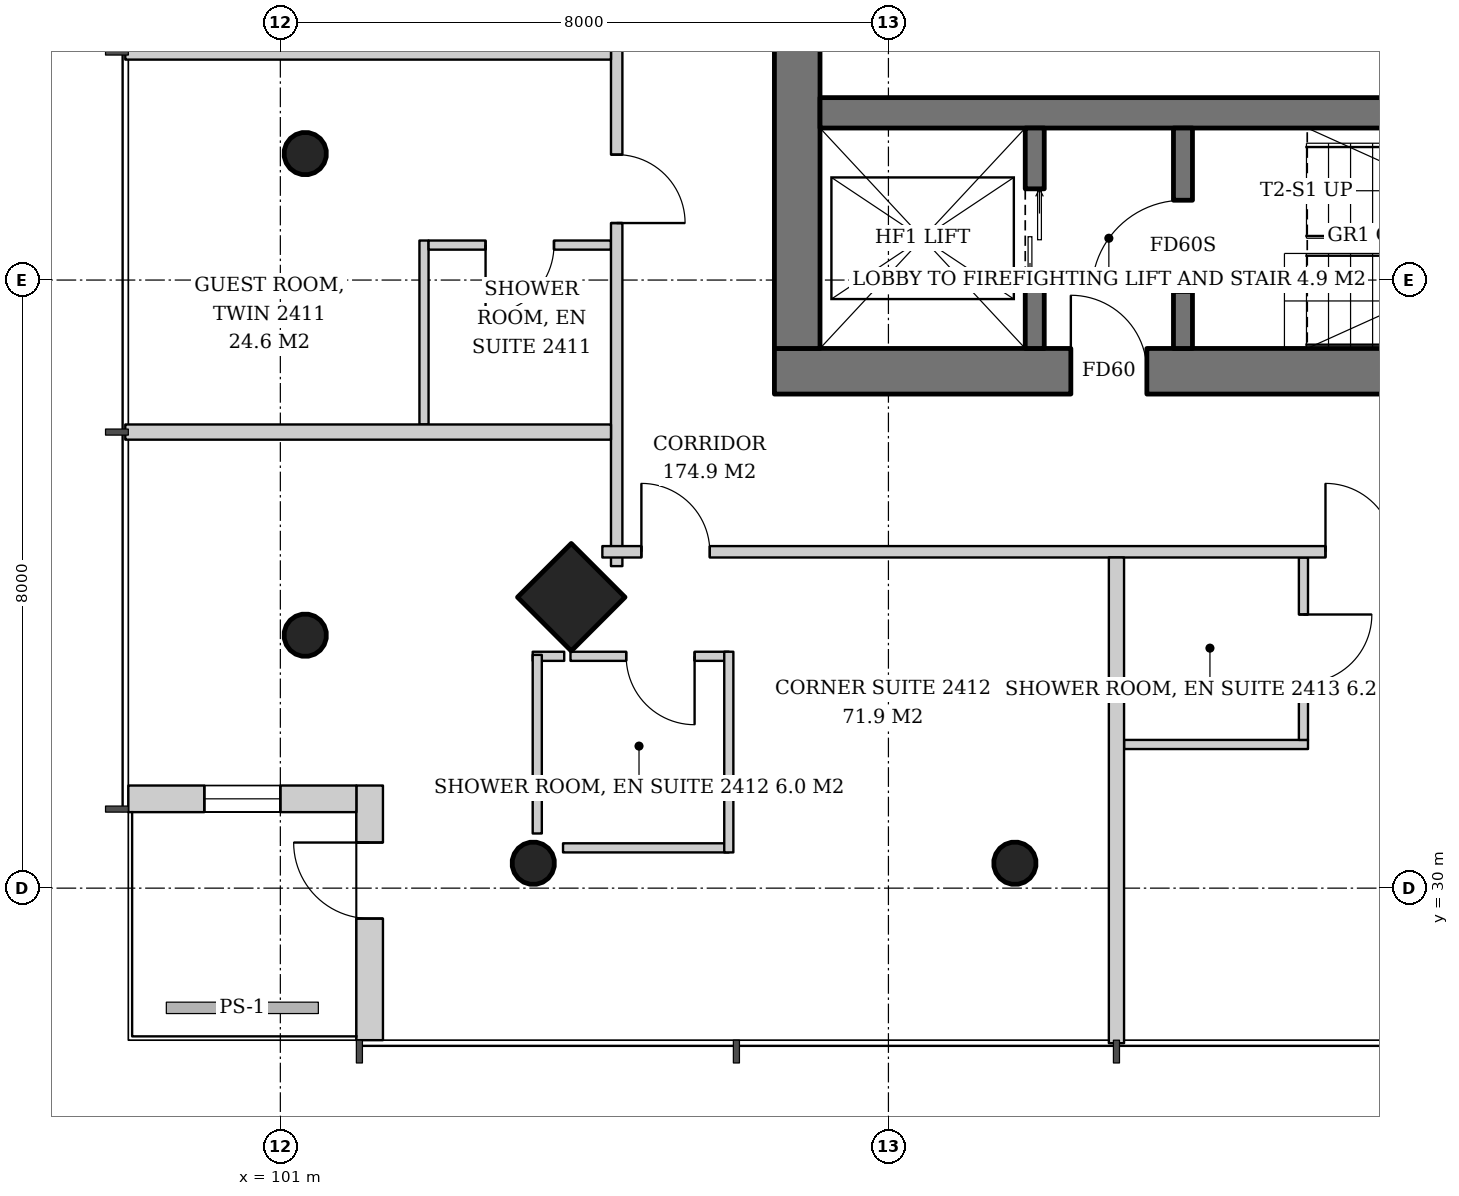
"""IFC4 building model, lengths in metres.
Left out: names, types, materials, properties, quantities, classifications, styles, units other than length and angle.
Written with IfcOpenShell. Run it as: python <this file> out.ifc"""

import sys

from ifc_helpers import new_model, si_unit, direction, frame, frame_2d, origin, origin_2d, place, context, subcontext, project, spatial, rectangle, hollow_circle, extrude, element, fill, save


model = new_model("IFC4")
c1 = context("Model", 3, precision=1e-05, world=origin(), true_north=direction((0.0, 1.0)))
c2 = subcontext(c1, "Body", "Model", "MODEL_VIEW")
j1 = project(units=[si_unit("LENGTHUNIT", "METRE"), si_unit("PLANEANGLEUNIT", "RADIAN")], contexts=[c1])
p1 = place(None, origin())
s1 = spatial("IfcSite", under=j1, at=p1, CompositionType="ELEMENT")
p2 = place(p1, origin())
s2 = spatial("IfcBuilding", under=s1, at=p2, CompositionType="ELEMENT")
p3 = place(p2, frame((0.0, 0.0, 97.0)))
s3 = spatial("IfcBuildingStorey", under=s2, at=p3, CompositionType="ELEMENT", Elevation=97.0)
p4 = place(p3, frame((104.776, 33.776, 0.0), z_axis=(0.043029647111, 0.043029647111, 0.998146732169), x_axis=(-0.707106781187, 0.707106781187, 0.0)))
e1 = element("IfcColumn", 1, at=p4, inside=s3, PredefinedType="COLUMN", context=c2, shape_type="SweptSolid", body=[
    extrude(rectangle(XDim=1.0, YDim=1.0, at=origin_2d()), origin(), (0.0, 0.0, 1.0), 3.807),
])
p5 = place(p3, frame((101.276, 33.276, 0.0), z_axis=(0.043029647111, 0.043029647111, 0.998146732169), x_axis=(-0.707106781187, 0.707106781187, 0.0)))
e2 = element("IfcColumn", 2, at=p5, inside=s3, PredefinedType="COLUMN", context=c2, shape_type="SweptSolid", body=[
    extrude(hollow_circle(Radius=0.28, WallThickness=0.02, at=origin_2d()), origin(), (0.0, 0.0, 1.0), 3.807),
])
p6 = place(p3, frame((101.276, 39.638, 0.0), z_axis=(0.043059584825, 0.021497706284, 0.998841188968), x_axis=(-0.446680166538, 0.894693706707, 0.0)))
e3 = element("IfcColumn", 3, at=p6, inside=s3, PredefinedType="COLUMN", context=c2, shape_type="SweptSolid", body=[
    extrude(hollow_circle(Radius=0.28, WallThickness=0.02, at=origin_2d()), origin(), (0.0, 0.0, 1.0), 3.804),
])
p7 = place(p3, frame((104.276, 30.276, 0.0), z_axis=(0.043029647111, 0.043029647111, 0.998146732169), x_axis=(-0.707106781187, 0.707106781187, 0.0)))
e4 = element("IfcColumn", 4, at=p7, inside=s3, PredefinedType="COLUMN", context=c2, shape_type="SweptSolid", body=[
    extrude(hollow_circle(Radius=0.28, WallThickness=0.02, at=origin_2d()), origin(), (0.0, 0.0, 1.0), 3.807),
])
p8 = place(p3, frame((110.638, 30.276, 0.0), z_axis=(0.021497706284, 0.043059584825, 0.998841188968), x_axis=(-0.894693706707, 0.446680166538, 0.0)))
e5 = element("IfcColumn", 5, at=p8, inside=s3, PredefinedType="COLUMN", context=c2, shape_type="SweptSolid", body=[
    extrude(hollow_circle(Radius=0.28, WallThickness=0.02, at=origin_2d()), origin(), (0.0, 0.0, 1.0), 3.804),
])
p9 = place(p3, frame((107.5, 36.8, 0.0), z_axis=(0.0, 0.0, 1.0), x_axis=(1.0, 0.0, 0.0)))
e6 = element("IfcWall", 6, at=p9, inside=s3, PredefinedType="SHEAR", context=c2, shape_type="SweptSolid", body=[
    extrude(rectangle(XDim=19.0, YDim=0.6, at=frame_2d((9.5, 0.0))), origin(), (0.0, 0.0, 1.0), 3.8),
])
p10 = place(p9, frame((3.9, 0.0, 0.0)))
e7 = element("IfcOpeningElement", 7, at=p10, cuts=e6, PredefinedType="OPENING", context=c2, shape_type="SweptSolid", body=[
    extrude(rectangle(XDim=1.0, YDim=2.1, at=frame_2d((0.5, 1.05))), frame((0.0, 0.31, 0.0), z_axis=(0.0, -1.0, 0.0), x_axis=(1.0, 0.0, 0.0)), (0.0, 0.0, 1.0), 0.62),
])
p11 = place(p9, frame((14.153, 0.0, 0.0)))
e8 = element("IfcOpeningElement", 8, at=p11, cuts=e6, PredefinedType="OPENING", context=c2, shape_type="SweptSolid", body=[
    extrude(rectangle(XDim=1.0, YDim=2.1, at=frame_2d((0.5, 1.05))), frame((0.0, 0.31, 0.0), z_axis=(0.0, -1.0, 0.0), x_axis=(1.0, 0.0, 0.0)), (0.0, 0.0, 1.0), 0.62),
])
p12 = place(p9, frame((16.2, 0.0, 0.0)))
e9 = element("IfcOpeningElement", 9, at=p12, cuts=e6, PredefinedType="OPENING", context=c2, shape_type="SweptSolid", body=[
    extrude(rectangle(XDim=1.0, YDim=2.1, at=frame_2d((0.5, 1.05))), frame((0.0, 0.31, 0.0), z_axis=(0.0, -1.0, 0.0), x_axis=(1.0, 0.0, 0.0)), (0.0, 0.0, 1.0), 0.62),
])
p13 = place(p3, frame((107.8, 37.1, 0.0), z_axis=(0.0, 0.0, 1.0), x_axis=(0.0, 1.0, 0.0)))
e10 = element("IfcWall", 10, at=p13, inside=s3, PredefinedType="SHEAR", context=c2, shape_type="SweptSolid", body=[
    extrude(rectangle(XDim=17.8, YDim=0.6, at=frame_2d((8.9, 0.0))), origin(), (0.0, 0.0, 1.0), 3.8),
])
p14 = place(p13, frame((8.0, 0.0, 0.0)))
e11 = element("IfcOpeningElement", 11, at=p14, cuts=e10, PredefinedType="OPENING", context=c2, shape_type="SweptSolid", body=[
    extrude(rectangle(XDim=1.8, YDim=2.4, at=frame_2d((0.9, 1.2))), frame((0.0, 0.31, 0.0), z_axis=(0.0, -1.0, 0.0), x_axis=(1.0, 0.0, 0.0)), (0.0, 0.0, 1.0), 0.62),
])
p15 = place(p3, frame((108.1, 40.2, 0.0), z_axis=(0.0, 0.0, 1.0), x_axis=(1.0, 0.0, 0.0)))
e12 = element("IfcWall", 12, at=p15, inside=s3, PredefinedType="SHEAR", context=c2, shape_type="SweptSolid", body=[
    extrude(rectangle(XDim=17.8, YDim=0.4, at=frame_2d((8.9, 0.0))), origin(), (0.0, 0.0, 1.0), 3.8),
])
p16 = place(p3, frame((102.175, 28.0, 0.0), z_axis=(0.0, 0.0, 1.0), x_axis=(0.0, 1.0, 0.0)))
e13 = element("IfcWall", 13, at=p16, inside=s3, PredefinedType="SOLIDWALL", context=c2, shape_type="SweptSolid", body=[
    extrude(rectangle(XDim=3.35, YDim=0.35, at=frame_2d((1.675, 0.0))), origin(), (0.0, 0.0, 1.0), 3.6),
])
p17 = place(p16, frame((1.6, 0.0, 0.0)))
e14 = element("IfcOpeningElement", 14, at=p17, cuts=e13, PredefinedType="OPENING", context=c2, shape_type="SweptSolid", body=[
    extrude(rectangle(XDim=1.0, YDim=2.4, at=frame_2d((0.5, 1.2))), frame((0.0, 0.185, 0.0), z_axis=(0.0, -1.0, 0.0), x_axis=(1.0, 0.0, 0.0)), (0.0, 0.0, 1.0), 0.37),
])
p18 = place(p3, frame((102.0, 31.175, 0.0), z_axis=(0.0, 0.0, 1.0), x_axis=(-1.0, 0.0, 0.0)))
e15 = element("IfcWall", 15, at=p18, inside=s3, PredefinedType="SOLIDWALL", context=c2, shape_type="SweptSolid", body=[
    extrude(rectangle(XDim=3.0, YDim=0.35, at=frame_2d((1.5, 0.0))), origin(), (0.0, 0.0, 1.0), 3.6),
])
p19 = place(p18, frame((1.0, 0.0, 0.9)))
e16 = element("IfcOpeningElement", 16, at=p19, cuts=e15, PredefinedType="OPENING", context=c2, shape_type="SweptSolid", body=[
    extrude(rectangle(XDim=1.0, YDim=2.4, at=frame_2d((0.5, 1.2))), frame((0.0, 0.185, 0.0), z_axis=(0.0, -1.0, 0.0), x_axis=(1.0, 0.0, 0.0)), (0.0, 0.0, 1.0), 0.37),
])
p20 = place(p3, frame((110.925, 37.1, 0.0), z_axis=(0.0, 0.0, 1.0), x_axis=(0.0, 1.0, 0.0)))
e17 = element("IfcWall", 17, at=p20, inside=s3, PredefinedType="SHEAR", context=c2, shape_type="SweptSolid", body=[
    extrude(rectangle(XDim=2.9, YDim=0.25, at=frame_2d((1.45, 0.0))), origin(), (0.0, 0.0, 1.0), 3.8),
])
p21 = place(p20, frame((0.8, 0.0, 0.0)))
e18 = element("IfcOpeningElement", 18, at=p21, cuts=e17, PredefinedType="OPENING", context=c2, shape_type="SweptSolid", body=[
    extrude(rectangle(XDim=1.3, YDim=2.2, at=frame_2d((0.65, 1.1))), frame((0.0, 0.135, 0.0), z_axis=(0.0, -1.0, 0.0), x_axis=(1.0, 0.0, 0.0)), (0.0, 0.0, 1.0), 0.27),
])
p22 = place(p3, frame((112.875, 37.1, 0.0), z_axis=(0.0, 0.0, 1.0), x_axis=(0.0, 1.0, 0.0)))
e19 = element("IfcWall", 19, at=p22, inside=s3, PredefinedType="SHEAR", context=c2, shape_type="SweptSolid", body=[
    extrude(rectangle(XDim=2.9, YDim=0.25, at=frame_2d((1.45, 0.0))), origin(), (0.0, 0.0, 1.0), 3.8),
])
p23 = place(p22, frame((0.75, 0.0, 0.0)))
e20 = element("IfcOpeningElement", 20, at=p23, cuts=e19, PredefinedType="OPENING", context=c2, shape_type="SweptSolid", body=[
    extrude(rectangle(XDim=1.2, YDim=2.1, at=frame_2d((0.6, 1.05))), frame((0.0, 0.135, 0.0), z_axis=(0.0, -1.0, 0.0), x_axis=(1.0, 0.0, 0.0)), (0.0, 0.0, 1.0), 0.27),
])
p24 = place(p3, frame((102.89, 38.52, 0.0), z_axis=(0.0, 0.0, 1.0), x_axis=(0.0, -1.0, 0.0)))
e21 = element("IfcWall", 21, at=p24, inside=s3, PredefinedType="PARTITIONING", context=c2, shape_type="SweptSolid", body=[
    extrude(rectangle(XDim=2.42, YDim=0.12, at=frame_2d((1.21, 0.0))), origin(), (0.0, 0.0, 1.0), 3.6),
])
p25 = place(p3, frame((105.35, 38.46, 0.0), z_axis=(0.0, 0.0, 1.0), x_axis=(-1.0, 0.0, 0.0)))
e22 = element("IfcWall", 22, at=p25, inside=s3, PredefinedType="PARTITIONING", context=c2, shape_type="SweptSolid", body=[
    extrude(rectangle(XDim=2.4, YDim=0.12, at=frame_2d((1.2, 0.0))), origin(), (0.0, 0.0, 1.0), 3.6),
])
p26 = place(p25, frame((0.75, 0.0, 0.0)))
e23 = element("IfcOpeningElement", 23, at=p26, cuts=e22, PredefinedType="OPENING", context=c2, shape_type="SweptSolid", body=[
    extrude(rectangle(XDim=0.9, YDim=2.1, at=frame_2d((0.45, 1.05))), frame((0.0, 0.07, 0.0), z_axis=(0.0, -1.0, 0.0), x_axis=(1.0, 0.0, 0.0)), (0.0, 0.0, 1.0), 0.14),
])
p27 = place(p3, frame((105.425, 57.764, 0.0), z_axis=(0.0, 0.0, 1.0), x_axis=(0.0, -1.0, 0.0)))
e24 = element("IfcWall", 24, at=p27, inside=s3, PredefinedType="PARTITIONING", context=c2, shape_type="SweptSolid", body=[
    extrude(rectangle(XDim=23.527, YDim=0.15, at=frame_2d((11.764, 0.0))), origin(), (0.0, 0.0, 1.0), 2.9),
])
p28 = place(p27, frame((0.514, 0.0, 0.0)))
e25 = element("IfcOpeningElement", 25, at=p28, cuts=e24, PredefinedType="OPENING", context=c2, shape_type="SweptSolid", body=[
    extrude(rectangle(XDim=0.9, YDim=2.1, at=frame_2d((0.45, 1.05))), frame((0.0, 0.085, 0.0), z_axis=(0.0, -1.0, 0.0), x_axis=(1.0, 0.0, 0.0)), (0.0, 0.0, 1.0), 0.17),
])
p29 = place(p27, frame((4.464, 0.0, 0.0)))
e26 = element("IfcOpeningElement", 26, at=p29, cuts=e24, PredefinedType="OPENING", context=c2, shape_type="SweptSolid", body=[
    extrude(rectangle(XDim=1.0, YDim=2.1, at=frame_2d((0.5, 1.05))), frame((0.0, 0.085, 0.0), z_axis=(0.0, -1.0, 0.0), x_axis=(1.0, 0.0, 0.0)), (0.0, 0.0, 1.0), 0.17),
])
p30 = place(p27, frame((9.514, 0.0, 0.0)))
e27 = element("IfcOpeningElement", 27, at=p30, cuts=e24, PredefinedType="OPENING", context=c2, shape_type="SweptSolid", body=[
    extrude(rectangle(XDim=0.9, YDim=2.1, at=frame_2d((0.45, 1.05))), frame((0.0, 0.085, 0.0), z_axis=(0.0, -1.0, 0.0), x_axis=(1.0, 0.0, 0.0)), (0.0, 0.0, 1.0), 0.17),
])
p31 = place(p27, frame((18.114, 0.0, 0.0)))
e28 = element("IfcOpeningElement", 28, at=p31, cuts=e24, PredefinedType="OPENING", context=c2, shape_type="SweptSolid", body=[
    extrude(rectangle(XDim=0.9, YDim=2.1, at=frame_2d((0.45, 1.05))), frame((0.0, 0.085, 0.0), z_axis=(0.0, -1.0, 0.0), x_axis=(1.0, 0.0, 0.0)), (0.0, 0.0, 1.0), 0.17),
])
for number, where, z_axis, x_axis in (
    (29, (105.35, 41.0, 0.0), (0.0, 0.0, 1.0), (-1.0, 0.0, 0.0)),
    (30, (105.35, 36.0, 0.0), (0.0, 0.0, 1.0), (-1.0, 0.0, 0.0)),
):
    element("IfcWall", number, at=place(p3, frame(where, z_axis=z_axis, x_axis=x_axis)), inside=s3, PredefinedType="PARTITIONING", context=c2, shape_type="SweptSolid", body=[
        extrude(rectangle(XDim=6.39, YDim=0.2, at=frame_2d((3.195, 0.0))), origin(), (0.0, 0.0, 1.0), 3.2),
    ])
p32 = place(p3, frame((106.9, 33.05, 0.0), z_axis=(0.0, 0.0, 1.0), x_axis=(-1.0, 0.0, 0.0)))
e31 = element("IfcWall", 31, at=p32, inside=s3, PredefinedType="PARTITIONING", context=c2, shape_type="SweptSolid", body=[
    extrude(rectangle(XDim=2.083, YDim=0.12, at=frame_2d((1.042, 0.0))), origin(), (0.0, 0.0, 1.0), 3.2),
])
p33 = place(p32, frame((0.45, 0.0, 0.0)))
e32 = element("IfcOpeningElement", 32, at=p33, cuts=e31, PredefinedType="OPENING", context=c2, shape_type="SweptSolid", body=[
    extrude(rectangle(XDim=0.9, YDim=2.1, at=frame_2d((0.45, 1.05))), frame((0.0, 0.07, 0.0), z_axis=(0.0, -1.0, 0.0), x_axis=(1.0, 0.0, 0.0)), (0.0, 0.0, 1.0), 0.14),
])
p34 = place(p3, frame((104.735, 33.05, 0.0), z_axis=(0.0, 0.0, 1.0), x_axis=(-1.0, 0.0, 0.0)))
e33 = element("IfcWall", 33, at=p34, inside=s3, PredefinedType="PARTITIONING", context=c2, shape_type="SweptSolid", body=[
    extrude(rectangle(XDim=0.415, YDim=0.12, at=frame_2d((0.207, 0.0))), origin(), (0.0, 0.0, 1.0), 3.2),
])
p35 = place(p3, frame((106.9, 30.53, 0.0), z_axis=(0.0, 0.0, 1.0), x_axis=(-1.0, 0.0, 0.0)))
e34 = element("IfcWall", 34, at=p35, inside=s3, PredefinedType="PARTITIONING", context=c2, shape_type="SweptSolid", body=[
    extrude(rectangle(XDim=2.181, YDim=0.12, at=frame_2d((1.09, 0.0))), origin(), (0.0, 0.0, 1.0), 3.2),
])
p36 = place(p3, frame((104.38, 33.069, 0.0), z_axis=(0.0, 0.0, 1.0), x_axis=(0.0, -1.0, 0.0)))
e35 = element("IfcWall", 35, at=p36, inside=s3, PredefinedType="PARTITIONING", context=c2, shape_type="SweptSolid", body=[
    extrude(rectangle(XDim=2.35, YDim=0.12, at=frame_2d((1.175, 0.0))), origin(), (0.0, 0.0, 1.0), 3.2),
])
p37 = place(p3, frame((106.9, 33.11, 0.0), z_axis=(0.0, 0.0, 1.0), x_axis=(0.0, -1.0, 0.0)))
e36 = element("IfcWall", 36, at=p37, inside=s3, PredefinedType="PARTITIONING", context=c2, shape_type="SweptSolid", body=[
    extrude(rectangle(XDim=2.64, YDim=0.12, at=frame_2d((1.32, 0.0))), origin(), (0.0, 0.0, 1.0), 3.2),
])
p38 = place(p3, frame((112.1, 31.89, 0.0), z_axis=(0.0, 0.0, 1.0), x_axis=(1.0, 0.0, 0.0)))
e37 = element("IfcWall", 37, at=p38, inside=s3, PredefinedType="PARTITIONING", context=c2, shape_type="SweptSolid", body=[
    extrude(rectangle(XDim=2.42, YDim=0.12, at=frame_2d((1.21, 0.0))), origin(), (0.0, 0.0, 1.0), 3.6),
])
p39 = place(p3, frame((114.46, 34.35, 0.0), z_axis=(0.0, 0.0, 1.0), x_axis=(0.0, -1.0, 0.0)))
e38 = element("IfcWall", 38, at=p39, inside=s3, PredefinedType="PARTITIONING", context=c2, shape_type="SweptSolid", body=[
    extrude(rectangle(XDim=2.4, YDim=0.12, at=frame_2d((1.2, 0.0))), origin(), (0.0, 0.0, 1.0), 3.6),
])
p40 = place(p39, frame((0.75, 0.0, 0.0)))
e39 = element("IfcOpeningElement", 39, at=p40, cuts=e38, PredefinedType="OPENING", context=c2, shape_type="SweptSolid", body=[
    extrude(rectangle(XDim=0.9, YDim=2.1, at=frame_2d((0.45, 1.05))), frame((0.0, 0.07, 0.0), z_axis=(0.0, -1.0, 0.0), x_axis=(1.0, 0.0, 0.0)), (0.0, 0.0, 1.0), 0.14),
])
p41 = place(p3, frame((105.236, 34.425, 0.0), z_axis=(0.0, 0.0, 1.0), x_axis=(1.0, 0.0, 0.0)))
e40 = element("IfcWall", 40, at=p41, inside=s3, PredefinedType="PARTITIONING", context=c2, shape_type="SweptSolid", body=[
    extrude(rectangle(XDim=23.527, YDim=0.15, at=frame_2d((11.764, 0.0))), origin(), (0.0, 0.0, 1.0), 2.9),
])
p42 = place(p41, frame((0.514, 0.0, 0.0)))
e41 = element("IfcOpeningElement", 41, at=p42, cuts=e40, PredefinedType="OPENING", context=c2, shape_type="SweptSolid", body=[
    extrude(rectangle(XDim=0.9, YDim=2.1, at=frame_2d((0.45, 1.05))), frame((0.0, 0.085, 0.0), z_axis=(0.0, -1.0, 0.0), x_axis=(1.0, 0.0, 0.0)), (0.0, 0.0, 1.0), 0.17),
])
p43 = place(p41, frame((9.514, 0.0, 0.0)))
e42 = element("IfcOpeningElement", 42, at=p43, cuts=e40, PredefinedType="OPENING", context=c2, shape_type="SweptSolid", body=[
    extrude(rectangle(XDim=0.9, YDim=2.1, at=frame_2d((0.45, 1.05))), frame((0.0, 0.085, 0.0), z_axis=(0.0, -1.0, 0.0), x_axis=(1.0, 0.0, 0.0)), (0.0, 0.0, 1.0), 0.17),
])
p44 = place(p41, frame((19.464, 0.0, 0.0)))
e43 = element("IfcOpeningElement", 43, at=p44, cuts=e40, PredefinedType="OPENING", context=c2, shape_type="SweptSolid", body=[
    extrude(rectangle(XDim=1.0, YDim=2.1, at=frame_2d((0.5, 1.05))), frame((0.0, 0.085, 0.0), z_axis=(0.0, -1.0, 0.0), x_axis=(1.0, 0.0, 0.0)), (0.0, 0.0, 1.0), 0.17),
])
p45 = place(p3, frame((112.0, 34.35, 0.0), z_axis=(0.0, 0.0, 1.0), x_axis=(0.0, -1.0, 0.0)))
e44 = element("IfcWall", 44, at=p45, inside=s3, PredefinedType="PARTITIONING", context=c2, shape_type="SweptSolid", body=[
    extrude(rectangle(XDim=6.39, YDim=0.2, at=frame_2d((3.195, 0.0))), origin(), (0.0, 0.0, 1.0), 3.0),
])
p46 = place(p17, origin())
e45 = element("IfcDoor", 45, at=p46, inside=s3, OperationType="SINGLE_SWING_RIGHT", PredefinedType="DOOR", context=c2, shape_type="SweptSolid", body=[
    extrude(rectangle(XDim=1.0, YDim=2.4, at=frame_2d((0.5, 1.2))), frame((0.0, 0.025, 0.0), z_axis=(0.0, -1.0, 0.0), x_axis=(1.0, 0.0, 0.0)), (0.0, 0.0, 1.0), 0.05),
])
fill(e14, e45)
p47 = place(p19, origin())
e46 = element("IfcWindow", 46, at=p47, inside=s3, PartitioningType="SINGLE_PANEL", PredefinedType="WINDOW", context=c2, shape_type="SweptSolid", body=[
    extrude(rectangle(XDim=1.0, YDim=2.4, at=frame_2d((0.5, 1.2))), frame((0.0, 0.03, 0.0), z_axis=(0.0, -1.0, 0.0), x_axis=(1.0, 0.0, 0.0)), (0.0, 0.0, 1.0), 0.06),
])
fill(e16, e46)
p48 = place(p21, origin())
e47 = element("IfcDoor", 47, at=p48, inside=s3, OperationType="DOUBLE_DOOR_SLIDING", PredefinedType="DOOR", context=c2, shape_type="SweptSolid", body=[
    extrude(rectangle(XDim=1.3, YDim=2.2, at=frame_2d((0.65, 1.1))), frame((0.0, 0.025, 0.0), z_axis=(0.0, -1.0, 0.0), x_axis=(1.0, 0.0, 0.0)), (0.0, 0.0, 1.0), 0.05),
])
fill(e18, e47)
p49 = place(p23, origin())
e48 = element("IfcDoor", 48, at=p49, inside=s3, OperationType="SINGLE_SWING_LEFT", PredefinedType="DOOR", context=c2, shape_type="SweptSolid", body=[
    extrude(rectangle(XDim=1.2, YDim=2.1, at=frame_2d((0.6, 1.05))), frame((0.0, 0.025, 0.0), z_axis=(0.0, -1.0, 0.0), x_axis=(1.0, 0.0, 0.0)), (0.0, 0.0, 1.0), 0.05),
])
fill(e20, e48)
p50 = place(p10, origin())
e49 = element("IfcDoor", 49, at=p50, inside=s3, OperationType="SINGLE_SWING_LEFT", PredefinedType="DOOR", context=c2, shape_type="SweptSolid", body=[
    extrude(rectangle(XDim=1.0, YDim=2.1, at=frame_2d((0.5, 1.05))), frame((0.0, 0.025, 0.0), z_axis=(0.0, -1.0, 0.0), x_axis=(1.0, 0.0, 0.0)), (0.0, 0.0, 1.0), 0.05),
])
fill(e7, e49)
p51 = place(p26, origin())
e50 = element("IfcDoor", 50, at=p51, inside=s3, OperationType="SINGLE_SWING_RIGHT", PredefinedType="DOOR", context=c2, shape_type="SweptSolid", body=[
    extrude(rectangle(XDim=0.9, YDim=2.1, at=frame_2d((0.45, 1.05))), frame((0.0, 0.025, 0.0), z_axis=(0.0, -1.0, 0.0), x_axis=(1.0, 0.0, 0.0)), (0.0, 0.0, 1.0), 0.05),
])
fill(e23, e50)
p52 = place(p31, origin())
e51 = element("IfcDoor", 51, at=p52, inside=s3, OperationType="SINGLE_SWING_RIGHT", PredefinedType="DOOR", context=c2, shape_type="SweptSolid", body=[
    extrude(rectangle(XDim=0.9, YDim=2.1, at=frame_2d((0.45, 1.05))), frame((0.0, 0.025, 0.0), z_axis=(0.0, -1.0, 0.0), x_axis=(1.0, 0.0, 0.0)), (0.0, 0.0, 1.0), 0.05),
])
fill(e28, e51)
p53 = place(p33, origin())
e52 = element("IfcDoor", 52, at=p53, inside=s3, OperationType="SINGLE_SWING_LEFT", PredefinedType="DOOR", context=c2, shape_type="SweptSolid", body=[
    extrude(rectangle(XDim=0.9, YDim=2.1, at=frame_2d((0.45, 1.05))), frame((0.0, 0.025, 0.0), z_axis=(0.0, -1.0, 0.0), x_axis=(1.0, 0.0, 0.0)), (0.0, 0.0, 1.0), 0.05),
])
fill(e32, e52)
p54 = place(p40, origin())
e53 = element("IfcDoor", 53, at=p54, inside=s3, OperationType="SINGLE_SWING_LEFT", PredefinedType="DOOR", context=c2, shape_type="SweptSolid", body=[
    extrude(rectangle(XDim=0.9, YDim=2.1, at=frame_2d((0.45, 1.05))), frame((0.0, 0.025, 0.0), z_axis=(0.0, -1.0, 0.0), x_axis=(1.0, 0.0, 0.0)), (0.0, 0.0, 1.0), 0.05),
])
fill(e39, e53)
p55 = place(p42, origin())
e54 = element("IfcDoor", 54, at=p55, inside=s3, OperationType="SINGLE_SWING_LEFT", PredefinedType="DOOR", context=c2, shape_type="SweptSolid", body=[
    extrude(rectangle(XDim=0.9, YDim=2.1, at=frame_2d((0.45, 1.05))), frame((0.0, 0.025, 0.0), z_axis=(0.0, -1.0, 0.0), x_axis=(1.0, 0.0, 0.0)), (0.0, 0.0, 1.0), 0.05),
])
fill(e41, e54)
p56 = place(p43, origin())
e55 = element("IfcDoor", 55, at=p56, inside=s3, OperationType="SINGLE_SWING_LEFT", PredefinedType="DOOR", context=c2, shape_type="SweptSolid", body=[
    extrude(rectangle(XDim=0.9, YDim=2.1, at=frame_2d((0.45, 1.05))), frame((0.0, 0.025, 0.0), z_axis=(0.0, -1.0, 0.0), x_axis=(1.0, 0.0, 0.0)), (0.0, 0.0, 1.0), 0.05),
])
fill(e42, e55)
save(model, sys.argv[1])
